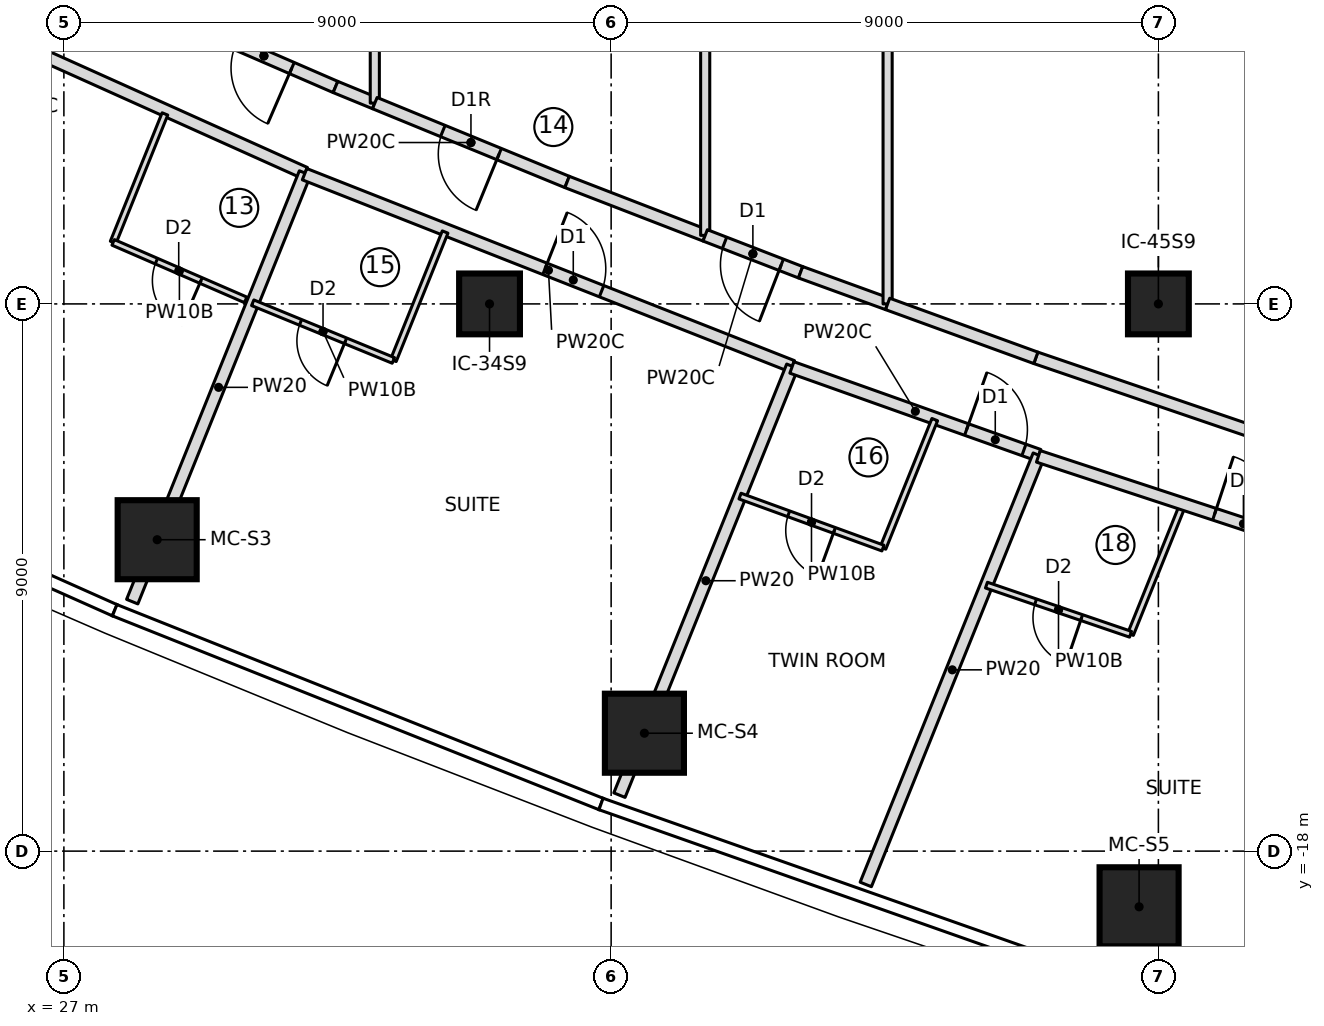
"""IFC4 building model, lengths in metres.
Left out: names, types, materials, properties, quantities, classifications, styles, units other than length and angle.
Written with IfcOpenShell. Run it as: python <this file> out.ifc"""

import sys

from ifc_helpers import new_model, si_unit, direction, frame, frame_2d, origin, origin_2d, place, context, subcontext, project, spatial, rectangle, extrude, element, fill, save


model = new_model("IFC4")
c1 = context("Model", 3, precision=1e-05, world=origin(), true_north=direction((0.0, 1.0)))
c2 = subcontext(c1, "Body", "Model", "MODEL_VIEW")
j1 = project(units=[si_unit("LENGTHUNIT", "METRE"), si_unit("PLANEANGLEUNIT", "RADIAN")], contexts=[c1])
p1 = place(None, origin())
s1 = spatial("IfcSite", under=j1, at=p1, CompositionType="ELEMENT")
p2 = place(p1, origin())
s2 = spatial("IfcBuilding", under=s1, at=p2, CompositionType="ELEMENT")
p3 = place(p2, frame((0.0, 0.0, 175.5)))
s3 = spatial("IfcBuildingStorey", under=s2, at=p3, CompositionType="ELEMENT", Elevation=175.5)
for number, where, z_axis, x_axis in (
    (1, (28.534, -12.878, 0.0), (0.0, 0.0, 1.0), (1.0, 0.0, 0.0)),
    (2, (36.547, -16.061, 0.0), (0.0, 0.0, 1.0), (1.0, 0.0, 0.0)),
    (3, (44.683, -18.916, 0.0), (0.0, 0.0, 1.0), (1.0, 0.0, 0.0)),
):
    element("IfcColumn", number, at=place(p3, frame(where, z_axis=z_axis, x_axis=x_axis)), inside=s3, PredefinedType="COLUMN", context=c2, shape_type="SweptSolid", body=[
        extrude(rectangle(XDim=1.3, YDim=1.3, at=origin_2d()), origin(), (0.0, 0.0, 1.0), 3.55),
    ])
for number, where, z_axis, x_axis in (
    (4, (34.0, -9.0, 0.0), (0.0, 0.0, 1.0), (1.0, 0.0, 0.0)),
    (5, (45.0, -9.0, 0.0), (0.0, 0.0, 1.0), (1.0, 0.0, 0.0)),
):
    element("IfcColumn", number, at=place(p3, frame(where, z_axis=z_axis, x_axis=x_axis)), inside=s3, PredefinedType="COLUMN", context=c2, shape_type="SweptSolid", body=[
        extrude(rectangle(XDim=1.0, YDim=1.0, at=origin_2d()), origin(), (0.0, 0.0, 1.0), 3.55),
    ])
p4 = place(p3, frame((21.704, -2.685, 0.0), z_axis=(0.0, 0.0, 1.0), x_axis=(0.912095082087, -0.409978732659, 0.0)))
e6 = element("IfcWall", 6, at=p4, inside=s3, PredefinedType="PARTITIONING", context=c2, shape_type="SweptSolid", body=[
    extrude(rectangle(XDim=10.154, YDim=0.2, at=frame_2d((5.077, 0.0))), origin(), (0.0, 0.0, 1.0), 3.25),
])
p5 = place(p4, frame((0.45, 0.0, 0.0)))
e7 = element("IfcOpeningElement", 7, at=p5, cuts=e6, PredefinedType="OPENING", context=c2, shape_type="SweptSolid", body=[
    extrude(rectangle(XDim=1.5, YDim=2.1, at=frame_2d((0.75, 1.05))), frame((0.0, 0.11, 0.0), z_axis=(0.0, -1.0, 0.0), x_axis=(1.0, 0.0, 0.0)), (0.0, 0.0, 1.0), 0.22),
])
p6 = place(p3, frame((27.81, -7.988, 0.0), z_axis=(0.0, 0.0, 1.0), x_axis=(0.373865727953, 0.927482839443, 0.0)))
e8 = element("IfcWall", 8, at=p6, inside=s3, PredefinedType="PARTITIONING", context=c2, shape_type="SweptSolid", body=[
    extrude(rectangle(XDim=2.278, YDim=0.1, at=frame_2d((1.139, 0.0))), origin(), (0.0, 0.0, 1.0), 3.25),
])
p7 = place(p3, frame((29.989, -8.933, 0.0), z_axis=(0.0, 0.0, 1.0), x_axis=(-0.917386792713, 0.397996824805, 0.0)))
e9 = element("IfcWall", 9, at=p7, inside=s3, PredefinedType="PARTITIONING", context=c2, shape_type="SweptSolid", body=[
    extrude(rectangle(XDim=2.375, YDim=0.1, at=frame_2d((1.188, 0.0))), origin(), (0.0, 0.0, 1.0), 3.25),
])
p8 = place(p7, frame((0.8, 0.0, 0.0)))
e10 = element("IfcOpeningElement", 10, at=p8, cuts=e9, PredefinedType="OPENING", context=c2, shape_type="SweptSolid", body=[
    extrude(rectangle(XDim=0.8, YDim=2.1, at=frame_2d((0.4, 1.05))), frame((0.0, 0.06, 0.0), z_axis=(0.0, -1.0, 0.0), x_axis=(1.0, 0.0, 0.0)), (0.0, 0.0, 1.0), 0.12),
])
p9 = place(p3, frame((28.124, -13.897, 0.0), z_axis=(0.0, 0.0, 1.0), x_axis=(0.373876084216, 0.927478664796, 0.0)))
e11 = element("IfcWall", 11, at=p9, inside=s3, PredefinedType="PARTITIONING", context=c2, shape_type="SweptSolid", body=[
    extrude(rectangle(XDim=7.6, YDim=0.2, at=frame_2d((3.8, 0.0))), origin(), (0.0, 0.0, 1.0), 3.25),
])
p10 = place(p3, frame((30.958, -6.866, 0.0), z_axis=(0.0, 0.0, 1.0), x_axis=(0.93040517394, -0.366532689274, 0.0)))
e12 = element("IfcWall", 12, at=p10, inside=s3, PredefinedType="PARTITIONING", context=c2, shape_type="SweptSolid", body=[
    extrude(rectangle(XDim=8.622, YDim=0.2, at=frame_2d((4.311, 0.0))), origin(), (0.0, 0.0, 1.0), 3.25),
])
p11 = place(p10, frame((4.25, 0.0, 0.0)))
e13 = element("IfcOpeningElement", 13, at=p11, cuts=e12, PredefinedType="OPENING", context=c2, shape_type="SweptSolid", body=[
    extrude(rectangle(XDim=1.0, YDim=2.1, at=frame_2d((0.5, 1.05))), frame((0.0, 0.11, 0.0), z_axis=(0.0, -1.0, 0.0), x_axis=(1.0, 0.0, 0.0)), (0.0, 0.0, 1.0), 0.22),
])
p12 = place(p3, frame((33.27, -7.818, 0.0), z_axis=(0.0, 0.0, 1.0), x_axis=(-0.373847853912, -0.927490044219, 0.0)))
e14 = element("IfcWall", 14, at=p12, inside=s3, PredefinedType="PARTITIONING", context=c2, shape_type="SweptSolid", body=[
    extrude(rectangle(XDim=2.277, YDim=0.1, at=frame_2d((1.139, 0.0))), origin(), (0.0, 0.0, 1.0), 3.25),
])
p13 = place(p3, frame((32.418, -9.93, 0.0), z_axis=(0.0, 0.0, 1.0), x_axis=(-0.92519499486, 0.379492057212, 0.0)))
e15 = element("IfcWall", 15, at=p13, inside=s3, PredefinedType="PARTITIONING", context=c2, shape_type="SweptSolid", body=[
    extrude(rectangle(XDim=2.5, YDim=0.1, at=frame_2d((1.25, 0.0))), origin(), (0.0, 0.0, 1.0), 3.25),
])
p14 = place(p13, frame((0.85, 0.0, 0.0)))
e16 = element("IfcOpeningElement", 16, at=p14, cuts=e15, PredefinedType="OPENING", context=c2, shape_type="SweptSolid", body=[
    extrude(rectangle(XDim=0.8, YDim=2.1, at=frame_2d((0.4, 1.05))), frame((0.0, 0.06, 0.0), z_axis=(0.0, -1.0, 0.0), x_axis=(1.0, 0.0, 0.0)), (0.0, 0.0, 1.0), 0.12),
])
p15 = place(p3, frame((36.137, -17.079, 0.0), z_axis=(0.0, 0.0, 1.0), x_axis=(0.373863662938, 0.927483671843, 0.0)))
e17 = element("IfcWall", 17, at=p15, inside=s3, PredefinedType="PARTITIONING", context=c2, shape_type="SweptSolid", body=[
    extrude(rectangle(XDim=7.604, YDim=0.2, at=frame_2d((3.802, 0.0))), origin(), (0.0, 0.0, 1.0), 3.25),
])
p16 = place(p3, frame((38.972, -10.045, 0.0), z_axis=(0.0, 0.0, 1.0), x_axis=(0.942220252757, -0.334994022773, 0.0)))
e18 = element("IfcWall", 18, at=p16, inside=s3, PredefinedType="PARTITIONING", context=c2, shape_type="SweptSolid", body=[
    extrude(rectangle(XDim=4.31, YDim=0.2, at=frame_2d((2.155, 0.0))), origin(), (0.0, 0.0, 1.0), 3.25),
])
p17 = place(p16, frame((3.05, 0.0, 0.0)))
e19 = element("IfcOpeningElement", 19, at=p17, cuts=e18, PredefinedType="OPENING", context=c2, shape_type="SweptSolid", body=[
    extrude(rectangle(XDim=1.0, YDim=2.1, at=frame_2d((0.5, 1.05))), frame((0.0, 0.11, 0.0), z_axis=(0.0, -1.0, 0.0), x_axis=(1.0, 0.0, 0.0)), (0.0, 0.0, 1.0), 0.22),
])
p18 = place(p3, frame((41.322, -10.903, 0.0), z_axis=(0.0, 0.0, 1.0), x_axis=(-0.373846436826, -0.927490615409, 0.0)))
e20 = element("IfcWall", 20, at=p18, inside=s3, PredefinedType="PARTITIONING", context=c2, shape_type="SweptSolid", body=[
    extrude(rectangle(XDim=2.279, YDim=0.1, at=frame_2d((1.139, 0.0))), origin(), (0.0, 0.0, 1.0), 3.25),
])
p19 = place(p3, frame((40.47, -13.016, 0.0), z_axis=(0.0, 0.0, 1.0), x_axis=(-0.939744972593, 0.341876273652, 0.0)))
e21 = element("IfcWall", 21, at=p19, inside=s3, PredefinedType="PARTITIONING", context=c2, shape_type="SweptSolid", body=[
    extrude(rectangle(XDim=2.501, YDim=0.1, at=frame_2d((1.251, 0.0))), origin(), (0.0, 0.0, 1.0), 3.25),
])
p20 = place(p19, frame((0.85, 0.0, 0.0)))
e22 = element("IfcOpeningElement", 22, at=p20, cuts=e21, PredefinedType="OPENING", context=c2, shape_type="SweptSolid", body=[
    extrude(rectangle(XDim=0.8, YDim=2.1, at=frame_2d((0.4, 1.05))), frame((0.0, 0.06, 0.0), z_axis=(0.0, -1.0, 0.0), x_axis=(1.0, 0.0, 0.0)), (0.0, 0.0, 1.0), 0.12),
])
p21 = place(p3, frame((40.188, -18.548, 0.0), z_axis=(0.0, 0.0, 1.0), x_axis=(0.373877998371, 0.927477893178, 0.0)))
e23 = element("IfcWall", 23, at=p21, inside=s3, PredefinedType="PARTITIONING", context=c2, shape_type="SweptSolid", body=[
    extrude(rectangle(XDim=7.611, YDim=0.2, at=frame_2d((3.806, 0.0))), origin(), (0.0, 0.0, 1.0), 3.25),
])
p22 = place(p3, frame((45.395, -12.318, 0.0), z_axis=(0.0, 0.0, 1.0), x_axis=(-0.373917841166, -0.927461831052, 0.0)))
e24 = element("IfcWall", 24, at=p22, inside=s3, PredefinedType="PARTITIONING", context=c2, shape_type="SweptSolid", body=[
    extrude(rectangle(XDim=2.281, YDim=0.1, at=frame_2d((1.14, 0.0))), origin(), (0.0, 0.0, 1.0), 3.25),
])
p23 = place(p3, frame((44.542, -14.434, 0.0), z_axis=(0.0, 0.0, 1.0), x_axis=(-0.946406575113, 0.322977699822, 0.0)))
e25 = element("IfcWall", 25, at=p23, inside=s3, PredefinedType="PARTITIONING", context=c2, shape_type="SweptSolid", body=[
    extrude(rectangle(XDim=2.504, YDim=0.1, at=frame_2d((1.252, 0.0))), origin(), (0.0, 0.0, 1.0), 3.25),
])
p24 = place(p23, frame((0.85, 0.0, 0.0)))
e26 = element("IfcOpeningElement", 26, at=p24, cuts=e25, PredefinedType="OPENING", context=c2, shape_type="SweptSolid", body=[
    extrude(rectangle(XDim=0.8, YDim=2.1, at=frame_2d((0.4, 1.05))), frame((0.0, 0.06, 0.0), z_axis=(0.0, -1.0, 0.0), x_axis=(1.0, 0.0, 0.0)), (0.0, 0.0, 1.0), 0.12),
])
p25 = place(p3, frame((31.467, -5.432, 0.0), z_axis=(0.0, 0.0, 1.0), x_axis=(-0.91737845263, 0.398016048231, 0.0)))
e27 = element("IfcWall", 27, at=p25, inside=s3, PredefinedType="PARTITIONING", context=c2, shape_type="SweptSolid", body=[
    extrude(rectangle(XDim=2.565, YDim=0.2, at=frame_2d((1.283, 0.0))), origin(), (0.0, 0.0, 1.0), 3.25),
])
p26 = place(p25, frame((0.783, 0.0, 0.0)))
e28 = element("IfcOpeningElement", 28, at=p26, cuts=e27, PredefinedType="OPENING", context=c2, shape_type="SweptSolid", body=[
    extrude(rectangle(XDim=1.0, YDim=2.1, at=frame_2d((0.5, 1.05))), frame((0.0, 0.11, 0.0), z_axis=(0.0, -1.0, 0.0), x_axis=(1.0, 0.0, 0.0)), (0.0, 0.0, 1.0), 0.22),
])
p27 = place(p3, frame((32.113, -5.697, 0.0), z_axis=(0.0, 0.0, 1.0), x_axis=(-0.92526293873, 0.379326368992, 0.0)))
e29 = element("IfcWall", 29, at=p27, inside=s3, PredefinedType="PARTITIONING", context=c2, shape_type="SweptSolid", body=[
    extrude(rectangle(XDim=0.699, YDim=0.2, at=frame_2d((0.35, 0.0))), origin(), (0.0, 0.0, 1.0), 3.25),
])
p28 = place(p3, frame((32.113, -5.697, 0.0), z_axis=(0.0, 0.0, 1.0), x_axis=(0.0, 1.0, 0.0)))
e30 = element("IfcWall", 30, at=p28, inside=s3, PredefinedType="PARTITIONING", context=c2, shape_type="SweptSolid", body=[
    extrude(rectangle(XDim=11.395, YDim=0.15, at=frame_2d((5.697, 0.0))), origin(), (0.0, 0.0, 1.0), 3.25),
])
p29 = place(p3, frame((35.276, -6.994, 0.0), z_axis=(0.0, 0.0, 1.0), x_axis=(-0.925194984271, 0.379492083026, 0.0)))
e31 = element("IfcWall", 31, at=p29, inside=s3, PredefinedType="PARTITIONING", context=c2, shape_type="SweptSolid", body=[
    extrude(rectangle(XDim=3.418, YDim=0.2, at=frame_2d((1.709, 0.0))), origin(), (0.0, 0.0, 1.0), 3.25),
])
p30 = place(p29, frame((1.209, 0.0, 0.0)))
e32 = element("IfcOpeningElement", 32, at=p30, cuts=e31, PredefinedType="OPENING", context=c2, shape_type="SweptSolid", body=[
    extrude(rectangle(XDim=1.0, YDim=2.1, at=frame_2d((0.5, 1.05))), frame((0.0, 0.11, 0.0), z_axis=(0.0, -1.0, 0.0), x_axis=(1.0, 0.0, 0.0)), (0.0, 0.0, 1.0), 0.22),
])
p31 = place(p3, frame((37.547, -7.873, 0.0), z_axis=(0.0, 0.0, 1.0), x_axis=(-0.932674754549, 0.36071845285, 0.0)))
e33 = element("IfcWall", 33, at=p31, inside=s3, PredefinedType="PARTITIONING", context=c2, shape_type="SweptSolid", body=[
    extrude(rectangle(XDim=2.435, YDim=0.2, at=frame_2d((1.218, 0.0))), origin(), (0.0, 0.0, 1.0), 3.25),
])
p32 = place(p3, frame((37.547, -7.873, 0.0), z_axis=(0.0, 0.0, 1.0), x_axis=(0.0, 1.0, 0.0)))
e34 = element("IfcWall", 34, at=p32, inside=s3, PredefinedType="PARTITIONING", context=c2, shape_type="SweptSolid", body=[
    extrude(rectangle(XDim=15.746, YDim=0.15, at=frame_2d((7.873, 0.0))), origin(), (0.0, 0.0, 1.0), 3.25),
])
p33 = place(p3, frame((39.115, -8.479, 0.0), z_axis=(0.0, 0.0, 1.0), x_axis=(-0.932670528514, 0.360729379511, 0.0)))
e35 = element("IfcWall", 35, at=p33, inside=s3, PredefinedType="PARTITIONING", context=c2, shape_type="SweptSolid", body=[
    extrude(rectangle(XDim=1.682, YDim=0.2, at=frame_2d((0.841, 0.0))), origin(), (0.0, 0.0, 1.0), 3.25),
])
p34 = place(p33, frame((0.341, 0.0, 0.0)))
e36 = element("IfcOpeningElement", 36, at=p34, cuts=e35, PredefinedType="OPENING", context=c2, shape_type="SweptSolid", body=[
    extrude(rectangle(XDim=1.0, YDim=2.1, at=frame_2d((0.5, 1.05))), frame((0.0, 0.11, 0.0), z_axis=(0.0, -1.0, 0.0), x_axis=(1.0, 0.0, 0.0)), (0.0, 0.0, 1.0), 0.22),
])
p35 = place(p3, frame((40.547, -9.0, 0.0), z_axis=(0.0, 0.0, 1.0), x_axis=(-0.939741934926, 0.341884623435, 0.0)))
e37 = element("IfcWall", 37, at=p35, inside=s3, PredefinedType="PARTITIONING", context=c2, shape_type="SweptSolid", body=[
    extrude(rectangle(XDim=1.523, YDim=0.2, at=frame_2d((0.762, 0.0))), origin(), (0.0, 0.0, 1.0), 3.25),
])
p36 = place(p3, frame((40.547, -9.0, 0.0), z_axis=(0.0, 0.0, 1.0), x_axis=(0.0, 1.0, 0.0)))
e38 = element("IfcWall", 38, at=p36, inside=s3, PredefinedType="PARTITIONING", context=c2, shape_type="SweptSolid", body=[
    extrude(rectangle(XDim=18.0, YDim=0.15, at=frame_2d((9.0, 0.0))), origin(), (0.0, 0.0, 1.0), 3.25),
])
p37 = place(p3, frame((46.881, -11.217, 0.0), z_axis=(0.0, 0.0, 1.0), x_axis=(-0.946436071896, 0.322891253852, 0.0)))
e39 = element("IfcWall", 39, at=p37, inside=s3, PredefinedType="PARTITIONING", context=c2, shape_type="SweptSolid", body=[
    extrude(rectangle(XDim=4.117, YDim=0.2, at=frame_2d((2.059, 0.0))), origin(), (0.0, 0.0, 1.0), 3.25),
])
p38 = place(p3, frame((42.984, -9.887, 0.0), z_axis=(0.0, 0.0, 1.0), x_axis=(-0.939719202565, 0.341947101655, 0.0)))
e40 = element("IfcWall", 40, at=p38, inside=s3, PredefinedType="PARTITIONING", context=c2, shape_type="SweptSolid", body=[
    extrude(rectangle(XDim=2.594, YDim=0.2, at=frame_2d((1.297, 0.0))), origin(), (0.0, 0.0, 1.0), 3.25),
])
p39 = place(p3, frame((43.026, -11.507, 0.0), z_axis=(0.0, 0.0, 1.0), x_axis=(0.949951949432, -0.312396052744, 0.0)))
e41 = element("IfcWall", 41, at=p39, inside=s3, PredefinedType="PARTITIONING", context=c2, shape_type="SweptSolid", body=[
    extrude(rectangle(XDim=5.394, YDim=0.2, at=frame_2d((2.697, 0.0))), origin(), (0.0, 0.0, 1.0), 3.25),
])
p40 = place(p39, frame((3.05, 0.0, 0.0)))
e42 = element("IfcOpeningElement", 42, at=p40, cuts=e41, PredefinedType="OPENING", context=c2, shape_type="SweptSolid", body=[
    extrude(rectangle(XDim=1.0, YDim=2.1, at=frame_2d((0.5, 1.05))), frame((0.0, 0.11, 0.0), z_axis=(0.0, -1.0, 0.0), x_axis=(1.0, 0.0, 0.0)), (0.0, 0.0, 1.0), 0.22),
])
p41 = place(p8, origin())
e43 = element("IfcDoor", 43, at=p41, inside=s3, OperationType="SINGLE_SWING_LEFT", PredefinedType="DOOR", context=c2, shape_type="SweptSolid", body=[
    extrude(rectangle(XDim=0.8, YDim=2.1, at=frame_2d((0.4, 1.05))), frame((0.0, 0.025, 0.0), z_axis=(0.0, -1.0, 0.0), x_axis=(1.0, 0.0, 0.0)), (0.0, 0.0, 1.0), 0.05),
])
fill(e10, e43)
p42 = place(p14, origin())
e44 = element("IfcDoor", 44, at=p42, inside=s3, OperationType="SINGLE_SWING_LEFT", PredefinedType="DOOR", context=c2, shape_type="SweptSolid", body=[
    extrude(rectangle(XDim=0.8, YDim=2.1, at=frame_2d((0.4, 1.05))), frame((0.0, 0.025, 0.0), z_axis=(0.0, -1.0, 0.0), x_axis=(1.0, 0.0, 0.0)), (0.0, 0.0, 1.0), 0.05),
])
fill(e16, e44)
p43 = place(p11, origin())
e45 = element("IfcDoor", 45, at=p43, inside=s3, OperationType="SINGLE_SWING_LEFT", PredefinedType="DOOR", context=c2, shape_type="SweptSolid", body=[
    extrude(rectangle(XDim=1.0, YDim=2.1, at=frame_2d((0.5, 1.05))), frame((0.0, 0.025, 0.0), z_axis=(0.0, -1.0, 0.0), x_axis=(1.0, 0.0, 0.0)), (0.0, 0.0, 1.0), 0.05),
])
fill(e13, e45)
p44 = place(p20, origin())
e46 = element("IfcDoor", 46, at=p44, inside=s3, OperationType="SINGLE_SWING_LEFT", PredefinedType="DOOR", context=c2, shape_type="SweptSolid", body=[
    extrude(rectangle(XDim=0.8, YDim=2.1, at=frame_2d((0.4, 1.05))), frame((0.0, 0.025, 0.0), z_axis=(0.0, -1.0, 0.0), x_axis=(1.0, 0.0, 0.0)), (0.0, 0.0, 1.0), 0.05),
])
fill(e22, e46)
p45 = place(p17, origin())
e47 = element("IfcDoor", 47, at=p45, inside=s3, OperationType="SINGLE_SWING_LEFT", PredefinedType="DOOR", context=c2, shape_type="SweptSolid", body=[
    extrude(rectangle(XDim=1.0, YDim=2.1, at=frame_2d((0.5, 1.05))), frame((0.0, 0.025, 0.0), z_axis=(0.0, -1.0, 0.0), x_axis=(1.0, 0.0, 0.0)), (0.0, 0.0, 1.0), 0.05),
])
fill(e19, e47)
p46 = place(p24, origin())
e48 = element("IfcDoor", 48, at=p46, inside=s3, OperationType="SINGLE_SWING_LEFT", PredefinedType="DOOR", context=c2, shape_type="SweptSolid", body=[
    extrude(rectangle(XDim=0.8, YDim=2.1, at=frame_2d((0.4, 1.05))), frame((0.0, 0.025, 0.0), z_axis=(0.0, -1.0, 0.0), x_axis=(1.0, 0.0, 0.0)), (0.0, 0.0, 1.0), 0.05),
])
fill(e26, e48)
p47 = place(p40, origin())
e49 = element("IfcDoor", 49, at=p47, inside=s3, OperationType="SINGLE_SWING_LEFT", PredefinedType="DOOR", context=c2, shape_type="SweptSolid", body=[
    extrude(rectangle(XDim=1.0, YDim=2.1, at=frame_2d((0.5, 1.05))), frame((0.0, 0.025, 0.0), z_axis=(0.0, -1.0, 0.0), x_axis=(1.0, 0.0, 0.0)), (0.0, 0.0, 1.0), 0.05),
])
fill(e42, e49)
p48 = place(p26, origin())
e50 = element("IfcDoor", 50, at=p48, inside=s3, OperationType="SINGLE_SWING_LEFT", PredefinedType="DOOR", context=c2, shape_type="SweptSolid", body=[
    extrude(rectangle(XDim=1.0, YDim=2.1, at=frame_2d((0.5, 1.05))), frame((0.0, 0.025, 0.0), z_axis=(0.0, -1.0, 0.0), x_axis=(1.0, 0.0, 0.0)), (0.0, 0.0, 1.0), 0.05),
])
fill(e28, e50)
p49 = place(p30, origin())
e51 = element("IfcDoor", 51, at=p49, inside=s3, OperationType="SINGLE_SWING_RIGHT", PredefinedType="DOOR", context=c2, shape_type="SweptSolid", body=[
    extrude(rectangle(XDim=1.0, YDim=2.1, at=frame_2d((0.5, 1.05))), frame((0.0, 0.025, 0.0), z_axis=(0.0, -1.0, 0.0), x_axis=(1.0, 0.0, 0.0)), (0.0, 0.0, 1.0), 0.05),
])
fill(e32, e51)
p50 = place(p34, origin())
e52 = element("IfcDoor", 52, at=p50, inside=s3, OperationType="SINGLE_SWING_LEFT", PredefinedType="DOOR", context=c2, shape_type="SweptSolid", body=[
    extrude(rectangle(XDim=1.0, YDim=2.1, at=frame_2d((0.5, 1.05))), frame((0.0, 0.025, 0.0), z_axis=(0.0, -1.0, 0.0), x_axis=(1.0, 0.0, 0.0)), (0.0, 0.0, 1.0), 0.05),
])
fill(e36, e52)
save(model, sys.argv[1])
